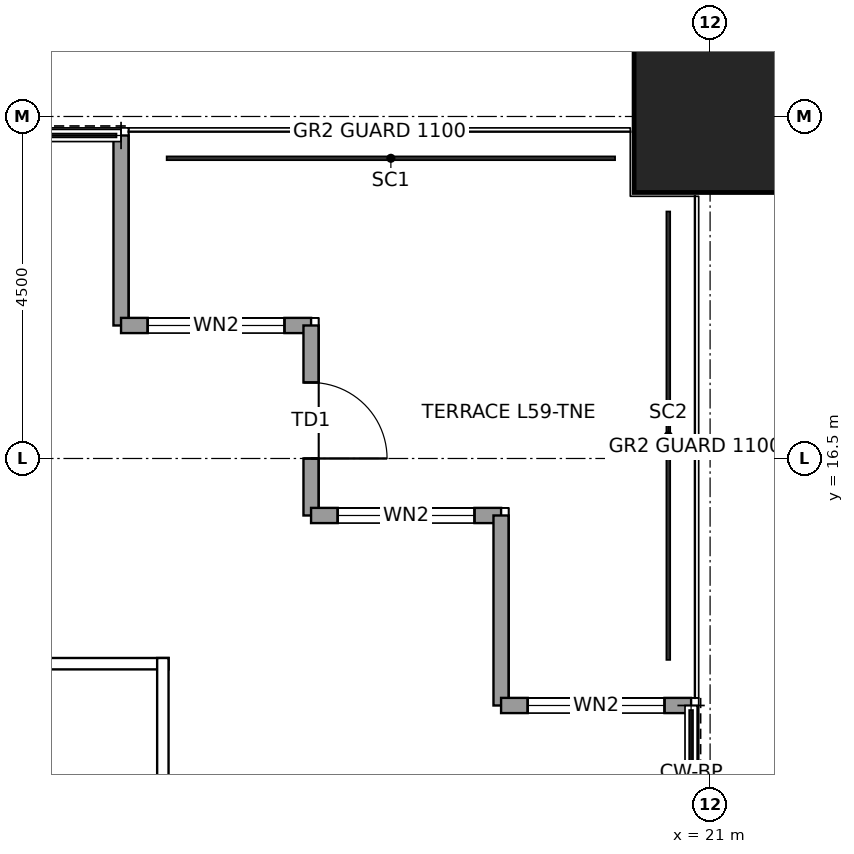
"""IFC4 building model, lengths in metres.
Left out: names, types, materials, properties, quantities, classifications, styles, units other than length and angle.
Written with IfcOpenShell. Run it as: python <this file> out.ifc"""

import sys

from ifc_helpers import new_model, si_unit, direction, frame, frame_2d, origin, origin_2d, place, context, subcontext, project, spatial, rectangle, hollow_rectangle, extrude, element, fill, save


model = new_model("IFC4")
c1 = context("Model", 3, precision=1e-05, world=origin(), true_north=direction((0.0, 1.0)))
c2 = subcontext(c1, "Body", "Model", "MODEL_VIEW")
j1 = project(units=[si_unit("LENGTHUNIT", "METRE"), si_unit("PLANEANGLEUNIT", "RADIAN")], contexts=[c1])
p1 = place(None, origin())
s1 = spatial("IfcSite", under=j1, at=p1, CompositionType="ELEMENT")
p2 = place(p1, origin())
s2 = spatial("IfcBuilding", under=s1, at=p2, CompositionType="ELEMENT")
p3 = place(p2, frame((0.0, 0.0, 271.9)))
s3 = spatial("IfcBuildingStorey", under=s2, at=p3, CompositionType="ELEMENT", Elevation=271.9)
p4 = place(p3, frame((21.0, 21.0, 0.0), z_axis=(0.0, 0.0, 1.0), x_axis=(1.0, 0.0, 0.0)))
e1 = element("IfcColumn", 1, at=p4, inside=s3, PredefinedType="COLUMN", context=c2, shape_type="SweptSolid", body=[
    extrude(hollow_rectangle(XDim=2.0, YDim=2.0, WallThickness=0.095, at=origin_2d()), origin(), (0.0, 0.0, 1.0), 4.0),
])
p5 = place(p3, frame((13.25, 20.75, 0.0), z_axis=(0.0, 0.0, 1.0), x_axis=(0.0, -1.0, 0.0)))
e2 = element("IfcWall", 2, at=p5, inside=s3, PredefinedType="SOLIDWALL", context=c2, shape_type="SweptSolid", body=[
    extrude(rectangle(XDim=2.5, YDim=0.2, at=frame_2d((1.25, 0.0))), origin(), (0.0, 0.0, 1.0), 3.85),
])
p6 = place(p3, frame((13.25, 18.25, 0.0), z_axis=(0.0, 0.0, 1.0), x_axis=(1.0, 0.0, 0.0)))
e3 = element("IfcWall", 3, at=p6, inside=s3, PredefinedType="SOLIDWALL", context=c2, shape_type="SweptSolid", body=[
    extrude(rectangle(XDim=2.5, YDim=0.2, at=frame_2d((1.25, 0.0))), origin(), (0.0, 0.0, 1.0), 3.85),
])
p7 = place(p6, frame((0.35, 0.0, 0.3)))
e4 = element("IfcOpeningElement", 4, at=p7, cuts=e3, PredefinedType="OPENING", context=c2, shape_type="SweptSolid", body=[
    extrude(rectangle(XDim=1.8, YDim=2.4, at=frame_2d((0.9, 1.2))), frame((0.0, 0.11, 0.0), z_axis=(0.0, -1.0, 0.0), x_axis=(1.0, 0.0, 0.0)), (0.0, 0.0, 1.0), 0.22),
])
p8 = place(p3, frame((15.75, 18.25, 0.0), z_axis=(0.0, 0.0, 1.0), x_axis=(0.0, -1.0, 0.0)))
e5 = element("IfcWall", 5, at=p8, inside=s3, PredefinedType="SOLIDWALL", context=c2, shape_type="SweptSolid", body=[
    extrude(rectangle(XDim=2.5, YDim=0.2, at=frame_2d((1.25, 0.0))), origin(), (0.0, 0.0, 1.0), 3.317),
])
p9 = place(p8, frame((0.75, 0.0, 0.0)))
e6 = element("IfcOpeningElement", 6, at=p9, cuts=e5, PredefinedType="OPENING", context=c2, shape_type="SweptSolid", body=[
    extrude(rectangle(XDim=1.0, YDim=2.4, at=frame_2d((0.5, 1.2))), frame((0.0, 0.11, 0.0), z_axis=(0.0, -1.0, 0.0), x_axis=(1.0, 0.0, 0.0)), (0.0, 0.0, 1.0), 0.22),
])
p10 = place(p3, frame((15.75, 15.75, 0.0), z_axis=(0.0, 0.0, 1.0), x_axis=(1.0, 0.0, 0.0)))
e7 = element("IfcWall", 7, at=p10, inside=s3, PredefinedType="SOLIDWALL", context=c2, shape_type="SweptSolid", body=[
    extrude(rectangle(XDim=2.5, YDim=0.2, at=frame_2d((1.25, 0.0))), origin(), (0.0, 0.0, 1.0), 3.85),
])
p11 = place(p10, frame((0.35, 0.0, 0.3)))
e8 = element("IfcOpeningElement", 8, at=p11, cuts=e7, PredefinedType="OPENING", context=c2, shape_type="SweptSolid", body=[
    extrude(rectangle(XDim=1.8, YDim=2.4, at=frame_2d((0.9, 1.2))), frame((0.0, 0.11, 0.0), z_axis=(0.0, -1.0, 0.0), x_axis=(1.0, 0.0, 0.0)), (0.0, 0.0, 1.0), 0.22),
])
p12 = place(p3, frame((18.25, 15.75, 0.0), z_axis=(0.0, 0.0, 1.0), x_axis=(0.0, -1.0, 0.0)))
e9 = element("IfcWall", 9, at=p12, inside=s3, PredefinedType="SOLIDWALL", context=c2, shape_type="SweptSolid", body=[
    extrude(rectangle(XDim=2.5, YDim=0.2, at=frame_2d((1.25, 0.0))), origin(), (0.0, 0.0, 1.0), 3.85),
])
p13 = place(p3, frame((18.25, 13.25, 0.0), z_axis=(0.0, 0.0, 1.0), x_axis=(1.0, 0.0, 0.0)))
e10 = element("IfcWall", 10, at=p13, inside=s3, PredefinedType="SOLIDWALL", context=c2, shape_type="SweptSolid", body=[
    extrude(rectangle(XDim=2.5, YDim=0.2, at=frame_2d((1.25, 0.0))), origin(), (0.0, 0.0, 1.0), 3.85),
])
p14 = place(p13, frame((0.35, 0.0, 0.3)))
e11 = element("IfcOpeningElement", 11, at=p14, cuts=e10, PredefinedType="OPENING", context=c2, shape_type="SweptSolid", body=[
    extrude(rectangle(XDim=1.8, YDim=2.4, at=frame_2d((0.9, 1.2))), frame((0.0, 0.11, 0.0), z_axis=(0.0, -1.0, 0.0), x_axis=(1.0, 0.0, 0.0)), (0.0, 0.0, 1.0), 0.22),
])
p15 = place(p3, frame((-13.875, 13.8, 0.0), z_axis=(0.0, 0.0, 1.0), x_axis=(1.0, 0.0, 0.0)))
e12 = element("IfcWall", 12, at=p15, inside=s3, PredefinedType="PARTITIONING", context=c2, shape_type="SweptSolid", body=[
    extrude(rectangle(XDim=27.75, YDim=0.15, at=frame_2d((13.875, 0.0))), origin(), (0.0, 0.0, 1.0), 3.85),
])
p16 = place(p15, frame((20.275, 0.0, 0.0)))
e13 = element("IfcOpeningElement", 13, at=p16, cuts=e12, PredefinedType="OPENING", context=c2, shape_type="SweptSolid", body=[
    extrude(rectangle(XDim=1.0, YDim=2.4, at=frame_2d((0.5, 1.2))), frame((0.0, 0.085, 0.0), z_axis=(0.0, -1.0, 0.0), x_axis=(1.0, 0.0, 0.0)), (0.0, 0.0, 1.0), 0.17),
])
p17 = place(p3, frame((13.8, 2.425, 0.0), z_axis=(0.0, 0.0, 1.0), x_axis=(0.0, 1.0, 0.0)))
e14 = element("IfcWall", 14, at=p17, inside=s3, PredefinedType="PARTITIONING", context=c2, shape_type="SweptSolid", body=[
    extrude(rectangle(XDim=11.45, YDim=0.15, at=frame_2d((5.725, 0.0))), origin(), (0.0, 0.0, 1.0), 3.85),
])
p18 = place(p7, origin())
e15 = element("IfcWindow", 15, at=p18, inside=s3, PartitioningType="SINGLE_PANEL", PredefinedType="WINDOW", context=c2, shape_type="SweptSolid", body=[
    extrude(rectangle(XDim=1.8, YDim=2.4, at=frame_2d((0.9, 1.2))), frame((0.0, 0.03, 0.0), z_axis=(0.0, -1.0, 0.0), x_axis=(1.0, 0.0, 0.0)), (0.0, 0.0, 1.0), 0.06),
])
fill(e4, e15)
p19 = place(p9, origin())
e16 = element("IfcDoor", 16, at=p19, inside=s3, OperationType="SINGLE_SWING_RIGHT", PredefinedType="DOOR", context=c2, shape_type="SweptSolid", body=[
    extrude(rectangle(XDim=1.0, YDim=2.4, at=frame_2d((0.5, 1.2))), frame((0.0, 0.025, 0.0), z_axis=(0.0, -1.0, 0.0), x_axis=(1.0, 0.0, 0.0)), (0.0, 0.0, 1.0), 0.05),
])
fill(e6, e16)
p20 = place(p11, origin())
e17 = element("IfcWindow", 17, at=p20, inside=s3, PartitioningType="SINGLE_PANEL", PredefinedType="WINDOW", context=c2, shape_type="SweptSolid", body=[
    extrude(rectangle(XDim=1.8, YDim=2.4, at=frame_2d((0.9, 1.2))), frame((0.0, 0.03, 0.0), z_axis=(0.0, -1.0, 0.0), x_axis=(1.0, 0.0, 0.0)), (0.0, 0.0, 1.0), 0.06),
])
fill(e8, e17)
p21 = place(p14, origin())
e18 = element("IfcWindow", 18, at=p21, inside=s3, PartitioningType="SINGLE_PANEL", PredefinedType="WINDOW", context=c2, shape_type="SweptSolid", body=[
    extrude(rectangle(XDim=1.8, YDim=2.4, at=frame_2d((0.9, 1.2))), frame((0.0, 0.03, 0.0), z_axis=(0.0, -1.0, 0.0), x_axis=(1.0, 0.0, 0.0)), (0.0, 0.0, 1.0), 0.06),
])
fill(e11, e18)
save(model, sys.argv[1])
